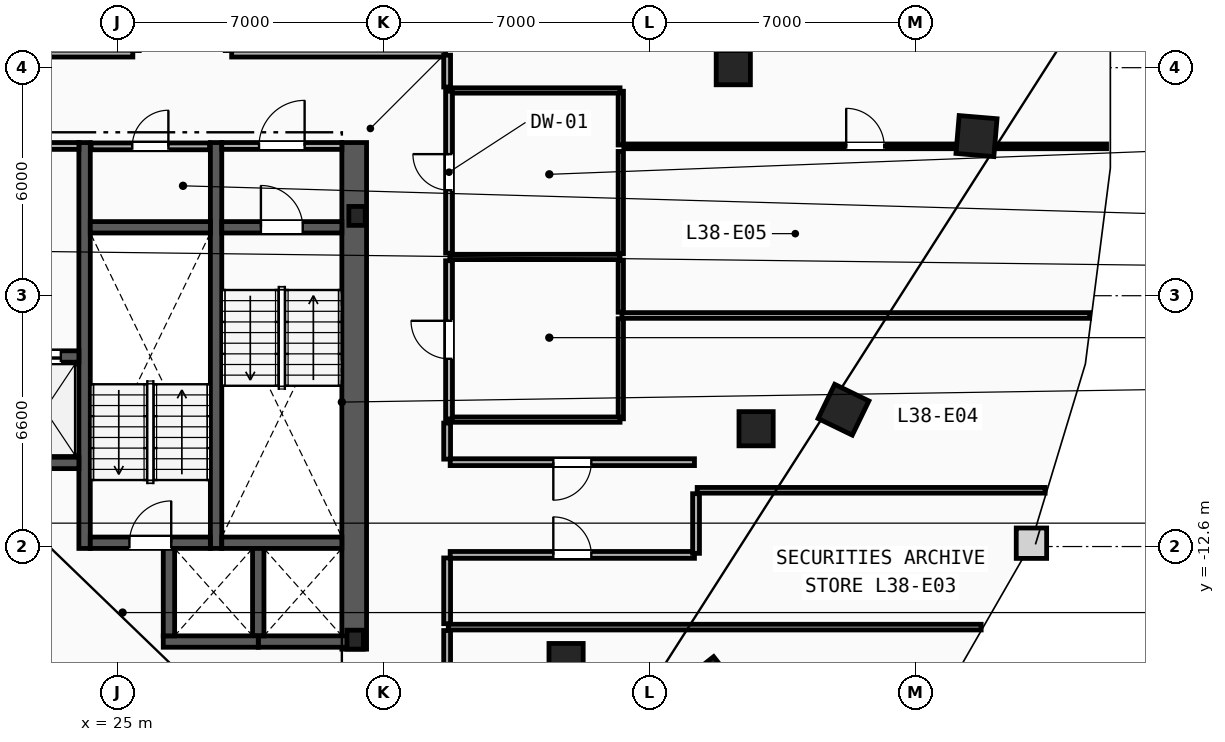
"""IFC4 building model, lengths in metres.
Left out: names, types, materials, properties, quantities, classifications, styles, units other than length and angle.
Written with IfcOpenShell. Run it as: python <this file> out.ifc"""

import sys

from ifc_helpers import new_model, si_unit, direction, frame, frame_2d, origin, origin_2d, place, context, subcontext, project, spatial, rectangle, i_section, extrude, element, fill, save


model = new_model("IFC4")
c1 = context("Model", 3, precision=1e-05, world=origin(), true_north=direction((0.0, 1.0)))
c2 = subcontext(c1, "Body", "Model", "MODEL_VIEW")
j1 = project(units=[si_unit("LENGTHUNIT", "METRE"), si_unit("PLANEANGLEUNIT", "RADIAN")], contexts=[c1])
p1 = place(None, origin())
s1 = spatial("IfcSite", under=j1, at=p1, CompositionType="ELEMENT")
p2 = place(p1, origin())
s2 = spatial("IfcBuilding", under=s1, at=p2, CompositionType="ELEMENT")
p3 = place(p2, frame((0.0, 0.0, 147.6)))
s3 = spatial("IfcBuildingStorey", under=s2, at=p3, CompositionType="ELEMENT", Elevation=147.6)
for number, where, z_axis, x_axis in (
    (1, (31.3, -3.9, 0.0), (0.0, 0.0, 1.0), (1.0, 0.0, 0.0)),
    (2, (31.25, -15.05, 0.0), (0.0, 0.0, 1.0), (1.0, 0.0, 0.0)),
):
    element("IfcColumn", number, at=place(p3, frame(where, z_axis=z_axis, x_axis=x_axis)), inside=s3, PredefinedType="COLUMN", context=c2, shape_type="SweptSolid", body=[
        extrude(i_section(OverallWidth=0.432, OverallDepth=0.498, WebThickness=0.056, FlangeThickness=0.089, FilletRadius=0.018, at=origin_2d()), origin(), (0.0, 0.0, 1.0), 3.6),
    ])
for number, where, z_axis, x_axis in (
    (3, (41.2, 0.0, 0.0), (0.0, 0.0, 1.0), (1.0, 0.0, 0.0)),
    (4, (41.8, -9.5, 0.0), (0.0, 0.0, 1.0), (1.0, 0.0, 0.0)),
    (5, (36.8, -15.6, 0.0), (0.0, 0.0, 1.0), (1.0, 0.0, 0.0)),
):
    element("IfcColumn", number, at=place(p3, frame(where, z_axis=z_axis, x_axis=x_axis)), inside=s3, PredefinedType="COLUMN", context=c2, shape_type="SweptSolid", body=[
        extrude(rectangle(XDim=0.9, YDim=0.9, at=origin_2d()), origin(), (0.0, 0.0, 1.0), 3.6),
    ])
for number, where, z_axis, x_axis in (
    (6, (40.6, -16.2, 0.0), (0.0, 0.0, 1.0), (0.785, 0.619, 0.0)),
    (7, (44.1, -9.0, 0.0), (0.0, 0.0, 1.0), (0.437, 0.899, 0.0)),
    (8, (47.6, -1.8, 0.0), (0.0, 0.0, 1.0), (0.084, 0.997, 0.0)),
):
    element("IfcColumn", number, at=place(p3, frame(where, z_axis=z_axis, x_axis=x_axis)), inside=s3, PredefinedType="COLUMN", context=c2, shape_type="SweptSolid", body=[
        extrude(rectangle(XDim=1.0, YDim=1.0, at=origin_2d()), origin(), (0.0, 0.0, 1.0), 3.6),
    ])
p4 = place(p3, frame((31.225, -15.3, 0.0), z_axis=(0.0, 0.0, 1.0), x_axis=(0.0, 1.0, 0.0)))
e9 = element("IfcWall", 9, at=p4, inside=s3, PredefinedType="SHEAR", context=c2, shape_type="SweptSolid", body=[
    extrude(rectangle(XDim=13.33, YDim=0.65, at=frame_2d((6.665, 0.0))), origin(), (0.0, 0.0, 1.0), 3.36),
])
for number, where, z_axis, x_axis in (
    (10, (27.59, -12.65, 0.0), (0.0, 0.0, 1.0), (0.0, 1.0, 0.0)),
    (11, (24.13, -12.65, 0.0), (0.0, 0.0, 1.0), (0.0, 1.0, 0.0)),
):
    element("IfcWall", number, at=place(p3, frame(where, z_axis=z_axis, x_axis=x_axis)), inside=s3, PredefinedType="SHEAR", context=c2, shape_type="SweptSolid", body=[
        extrude(rectangle(XDim=10.68, YDim=0.3, at=frame_2d((5.34, 0.0))), origin(), (0.0, 0.0, 1.0), 3.36),
    ])
p5 = place(p3, frame((27.74, -4.2, 0.0), z_axis=(0.0, 0.0, 1.0), x_axis=(1.0, 0.0, 0.0)))
e12 = element("IfcWall", 12, at=p5, inside=s3, PredefinedType="SHEAR", context=c2, shape_type="SweptSolid", body=[
    extrude(rectangle(XDim=3.16, YDim=0.3, at=frame_2d((1.58, 0.0))), origin(), (0.0, 0.0, 1.0), 3.36),
])
p6 = place(p5, frame((1.03, 0.0, 0.0)))
e13 = element("IfcOpeningElement", 13, at=p6, cuts=e12, PredefinedType="OPENING", context=c2, shape_type="SweptSolid", body=[
    extrude(rectangle(XDim=1.1, YDim=2.15, at=frame_2d((0.55, 1.075))), frame((0.0, 0.16, 0.0), z_axis=(0.0, -1.0, 0.0), x_axis=(1.0, 0.0, 0.0)), (0.0, 0.0, 1.0), 0.32),
])
p7 = place(p3, frame((27.74, -12.5, 0.0), z_axis=(0.0, 0.0, 1.0), x_axis=(1.0, 0.0, 0.0)))
e14 = element("IfcWall", 14, at=p7, inside=s3, PredefinedType="SHEAR", context=c2, shape_type="SweptSolid", body=[
    extrude(rectangle(XDim=3.16, YDim=0.3, at=frame_2d((1.58, 0.0))), origin(), (0.0, 0.0, 1.0), 3.36),
])
p8 = place(p3, frame((24.28, -12.5, 0.0), z_axis=(0.0, 0.0, 1.0), x_axis=(1.0, 0.0, 0.0)))
e15 = element("IfcWall", 15, at=p8, inside=s3, PredefinedType="SHEAR", context=c2, shape_type="SweptSolid", body=[
    extrude(rectangle(XDim=3.16, YDim=0.3, at=frame_2d((1.58, 0.0))), origin(), (0.0, 0.0, 1.0), 3.36),
])
p9 = place(p8, frame((1.03, 0.0, 0.0)))
e16 = element("IfcOpeningElement", 16, at=p9, cuts=e15, PredefinedType="OPENING", context=c2, shape_type="SweptSolid", body=[
    extrude(rectangle(XDim=1.1, YDim=2.15, at=frame_2d((0.55, 1.075))), frame((0.0, 0.16, 0.0), z_axis=(0.0, -1.0, 0.0), x_axis=(1.0, 0.0, 0.0)), (0.0, 0.0, 1.0), 0.32),
])
p10 = place(p3, frame((24.28, -4.2, 0.0), z_axis=(0.0, 0.0, 1.0), x_axis=(1.0, 0.0, 0.0)))
e17 = element("IfcWall", 17, at=p10, inside=s3, PredefinedType="SHEAR", context=c2, shape_type="SweptSolid", body=[
    extrude(rectangle(XDim=3.16, YDim=0.3, at=frame_2d((1.58, 0.0))), origin(), (0.0, 0.0, 1.0), 3.36),
])
p11 = place(p3, frame((20.98, -2.06, 0.0), z_axis=(0.0, 0.0, 1.0), x_axis=(1.0, 0.0, 0.0)))
e18 = element("IfcWall", 18, at=p11, inside=s3, PredefinedType="PARTITIONING", context=c2, shape_type="SweptSolid", body=[
    extrude(rectangle(XDim=3.0, YDim=0.18, at=frame_2d((1.5, 0.0))), origin(), (0.0, 0.0, 1.0), 3.36),
])
p12 = place(p11, frame((0.9, 0.0, 0.0)))
e19 = element("IfcOpeningElement", 19, at=p12, cuts=e18, PredefinedType="OPENING", context=c2, shape_type="SweptSolid", body=[
    extrude(rectangle(XDim=1.2, YDim=2.15, at=frame_2d((0.6, 1.075))), frame((0.0, 0.1, 0.0), z_axis=(0.0, -1.0, 0.0), x_axis=(1.0, 0.0, 0.0)), (0.0, 0.0, 1.0), 0.2),
])
p13 = place(p3, frame((27.74, -2.06, 0.0), z_axis=(0.0, 0.0, 1.0), x_axis=(1.0, 0.0, 0.0)))
e20 = element("IfcWall", 20, at=p13, inside=s3, PredefinedType="PARTITIONING", context=c2, shape_type="SweptSolid", body=[
    extrude(rectangle(XDim=3.16, YDim=0.18, at=frame_2d((1.58, 0.0))), origin(), (0.0, 0.0, 1.0), 3.36),
])
p14 = place(p13, frame((0.98, 0.0, 0.0)))
e21 = element("IfcOpeningElement", 21, at=p14, cuts=e20, PredefinedType="OPENING", context=c2, shape_type="SweptSolid", body=[
    extrude(rectangle(XDim=1.2, YDim=2.15, at=frame_2d((0.6, 1.075))), frame((0.0, 0.1, 0.0), z_axis=(0.0, -1.0, 0.0), x_axis=(1.0, 0.0, 0.0)), (0.0, 0.0, 1.0), 0.2),
])
p15 = place(p3, frame((21.88, -7.6, 0.0), z_axis=(0.0, 0.0, 1.0), x_axis=(1.0, 0.0, 0.0)))
e22 = element("IfcWall", 22, at=p15, inside=s3, PredefinedType="SHEAR", context=c2, shape_type="SweptSolid", body=[
    extrude(rectangle(XDim=2.1, YDim=0.3, at=frame_2d((1.05, 0.0))), origin(), (0.0, 0.0, 1.0), 3.36),
])
p16 = place(p15, frame((0.475, 0.0, 0.0)))
e23 = element("IfcOpeningElement", 23, at=p16, cuts=e22, PredefinedType="OPENING", context=c2, shape_type="SweptSolid", body=[
    extrude(rectangle(XDim=1.15, YDim=2.2, at=frame_2d((0.575, 1.1))), frame((0.0, 0.16, 0.0), z_axis=(0.0, -1.0, 0.0), x_axis=(1.0, 0.0, 0.0)), (0.0, 0.0, 1.0), 0.32),
])
p17 = place(p3, frame((21.88, -10.4, 0.0), z_axis=(0.0, 0.0, 1.0), x_axis=(1.0, 0.0, 0.0)))
e24 = element("IfcWall", 24, at=p17, inside=s3, PredefinedType="SHEAR", context=c2, shape_type="SweptSolid", body=[
    extrude(rectangle(XDim=2.1, YDim=0.3, at=frame_2d((1.05, 0.0))), origin(), (0.0, 0.0, 1.0), 3.36),
])
p18 = place(p3, frame((28.7, -15.1, 0.0), z_axis=(0.0, 0.0, 1.0), x_axis=(1.0, 0.0, 0.0)))
e25 = element("IfcWall", 25, at=p18, inside=s3, PredefinedType="SHEAR", context=c2, shape_type="SweptSolid", body=[
    extrude(rectangle(XDim=2.5, YDim=0.3, at=frame_2d((1.25, 0.0))), origin(), (0.0, 0.0, 1.0), 3.36),
])
p19 = place(p3, frame((28.7, -14.95, 0.0), z_axis=(0.0, 0.0, 1.0), x_axis=(0.0, 1.0, 0.0)))
e26 = element("IfcWall", 26, at=p19, inside=s3, PredefinedType="SHEAR", context=c2, shape_type="SweptSolid", body=[
    extrude(rectangle(XDim=2.3, YDim=0.3, at=frame_2d((1.15, 0.0))), origin(), (0.0, 0.0, 1.0), 3.36),
])
p20 = place(p3, frame((26.2, -15.1, 0.0), z_axis=(0.0, 0.0, 1.0), x_axis=(1.0, 0.0, 0.0)))
e27 = element("IfcWall", 27, at=p20, inside=s3, PredefinedType="SHEAR", context=c2, shape_type="SweptSolid", body=[
    extrude(rectangle(XDim=2.5, YDim=0.3, at=frame_2d((1.25, 0.0))), origin(), (0.0, 0.0, 1.0), 3.36),
])
p21 = place(p3, frame((26.35, -14.95, 0.0), z_axis=(0.0, 0.0, 1.0), x_axis=(0.0, 1.0, 0.0)))
e28 = element("IfcWall", 28, at=p21, inside=s3, PredefinedType="SHEAR", context=c2, shape_type="SweptSolid", body=[
    extrude(rectangle(XDim=2.3, YDim=0.3, at=frame_2d((1.15, 0.0))), origin(), (0.0, 0.0, 1.0), 3.36),
])
p22 = place(p3, frame((24.3, -2.07, 0.0), z_axis=(0.0, 0.0, 1.0), x_axis=(1.0, 0.0, 0.0)))
e29 = element("IfcWall", 29, at=p22, inside=s3, PredefinedType="PARTITIONING", context=c2, shape_type="SweptSolid", body=[
    extrude(rectangle(XDim=3.12, YDim=0.18, at=frame_2d((1.56, 0.0))), origin(), (0.0, 0.0, 1.0), 3.36),
])
p23 = place(p22, frame((1.085, 0.0, 0.0)))
e30 = element("IfcOpeningElement", 30, at=p23, cuts=e29, PredefinedType="OPENING", context=c2, shape_type="SweptSolid", body=[
    extrude(rectangle(XDim=0.95, YDim=2.1, at=frame_2d((0.475, 1.05))), frame((0.0, 0.1, 0.0), z_axis=(0.0, -1.0, 0.0), x_axis=(1.0, 0.0, 0.0)), (0.0, 0.0, 1.0), 0.2),
])
p24 = place(p3, frame((38.24, -9.24, 0.0), z_axis=(0.0, 0.0, 1.0), x_axis=(0.0, 1.0, 0.0)))
e31 = element("IfcWall", 31, at=p24, inside=s3, PredefinedType="PARTITIONING", context=c2, shape_type="SweptSolid", body=[
    extrude(rectangle(XDim=2.635, YDim=0.14, at=frame_2d((1.317, 0.0))), origin(), (0.0, 0.0, 1.0), 3.36),
])
p25 = place(p3, frame((38.24, -6.435, 0.0), z_axis=(0.0, 0.0, 1.0), x_axis=(0.0, 1.0, 0.0)))
e32 = element("IfcWall", 32, at=p25, inside=s3, PredefinedType="PARTITIONING", context=c2, shape_type="SweptSolid", body=[
    extrude(rectangle(XDim=1.37, YDim=0.14, at=frame_2d((0.685, 0.0))), origin(), (0.0, 0.0, 1.0), 3.36),
])
p26 = place(p3, frame((38.24, -4.895, 0.0), z_axis=(0.0, 0.0, 1.0), x_axis=(0.0, 1.0, 0.0)))
e33 = element("IfcWall", 33, at=p26, inside=s3, PredefinedType="PARTITIONING", context=c2, shape_type="SweptSolid", body=[
    extrude(rectangle(XDim=2.69, YDim=0.14, at=frame_2d((1.345, 0.0))), origin(), (0.0, 0.0, 1.0), 3.36),
])
p27 = place(p3, frame((38.24, -2.035, 0.0), z_axis=(0.0, 0.0, 1.0), x_axis=(0.0, 1.0, 0.0)))
e34 = element("IfcWall", 34, at=p27, inside=s3, PredefinedType="PARTITIONING", context=c2, shape_type="SweptSolid", body=[
    extrude(rectangle(XDim=1.415, YDim=0.14, at=frame_2d((0.708, 0.0))), origin(), (0.0, 0.0, 1.0), 3.36),
])
for number, where, z_axis, x_axis in (
    (35, (33.74, -0.6, 0.0), (0.0, 0.0, 1.0), (1.0, 0.0, 0.0)),
    (36, (33.74, -4.98, 0.0), (0.0, 0.0, 1.0), (1.0, 0.0, 0.0)),
    (37, (33.74, -9.26, 0.0), (0.0, 0.0, 1.0), (1.0, 0.0, 0.0)),
):
    element("IfcWall", number, at=place(p3, frame(where, z_axis=z_axis, x_axis=x_axis)), inside=s3, PredefinedType="PARTITIONING", context=c2, shape_type="SweptSolid", body=[
        extrude(rectangle(XDim=4.48, YDim=0.14, at=frame_2d((2.24, 0.0))), origin(), (0.0, 0.0, 1.0), 3.36),
    ])
p28 = place(p3, frame((33.72, -4.88, 0.0), z_axis=(0.0, 0.0, 1.0), x_axis=(0.0, 1.0, 0.0)))
e38 = element("IfcWall", 38, at=p28, inside=s3, PredefinedType="PARTITIONING", context=c2, shape_type="SweptSolid", body=[
    extrude(rectangle(XDim=4.26, YDim=0.18, at=frame_2d((2.13, 0.0))), origin(), (0.0, 0.0, 1.0), 3.36),
])
p29 = place(p28, frame((1.655, 0.0, 0.0)))
e39 = element("IfcOpeningElement", 39, at=p29, cuts=e38, PredefinedType="OPENING", context=c2, shape_type="SweptSolid", body=[
    extrude(rectangle(XDim=0.95, YDim=2.1, at=frame_2d((0.475, 1.05))), frame((0.0, 0.1, 0.0), z_axis=(0.0, -1.0, 0.0), x_axis=(1.0, 0.0, 0.0)), (0.0, 0.0, 1.0), 0.2),
])
p30 = place(p3, frame((33.72, -9.24, 0.0), z_axis=(0.0, 0.0, 1.0), x_axis=(0.0, 1.0, 0.0)))
e40 = element("IfcWall", 40, at=p30, inside=s3, PredefinedType="PARTITIONING", context=c2, shape_type="SweptSolid", body=[
    extrude(rectangle(XDim=4.16, YDim=0.18, at=frame_2d((2.08, 0.0))), origin(), (0.0, 0.0, 1.0), 3.36),
])
p31 = place(p30, frame((1.58, 0.0, 0.0)))
e41 = element("IfcOpeningElement", 41, at=p31, cuts=e40, PredefinedType="OPENING", context=c2, shape_type="SweptSolid", body=[
    extrude(rectangle(XDim=1.0, YDim=2.15, at=frame_2d((0.5, 1.075))), frame((0.0, 0.1, 0.0), z_axis=(0.0, -1.0, 0.0), x_axis=(1.0, 0.0, 0.0)), (0.0, 0.0, 1.0), 0.2),
])
p32 = place(p3, frame((38.27, -6.52, 0.0), z_axis=(0.0, 0.0, 1.0), x_axis=(1.0, 0.0, 0.0)))
e42 = element("IfcWall", 42, at=p32, inside=s3, PredefinedType="PARTITIONING", context=c2, shape_type="SweptSolid", body=[
    extrude(rectangle(XDim=12.307, YDim=0.15, at=frame_2d((6.154, 0.0))), origin(), (0.0, 0.0, 1.0), 3.36),
])
p33 = place(p3, frame((40.25, -11.12, 0.0), z_axis=(0.0, 0.0, 1.0), x_axis=(1.0, 0.0, 0.0)))
e43 = element("IfcWall", 43, at=p33, inside=s3, PredefinedType="PARTITIONING", context=c2, shape_type="SweptSolid", body=[
    extrude(rectangle(XDim=9.156, YDim=0.15, at=frame_2d((4.578, 0.0))), origin(), (0.0, 0.0, 1.0), 3.36),
])
p34 = place(p3, frame((33.7, -14.72, 0.0), z_axis=(0.0, 0.0, 1.0), x_axis=(1.0, 0.0, 0.0)))
e44 = element("IfcWall", 44, at=p34, inside=s3, PredefinedType="PARTITIONING", context=c2, shape_type="SweptSolid", body=[
    extrude(rectangle(XDim=14.023, YDim=0.15, at=frame_2d((7.011, 0.0))), origin(), (0.0, 0.0, 1.0), 3.36),
])
p35 = place(p3, frame((33.67, -17.428, 0.0), z_axis=(0.0, 0.0, 1.0), x_axis=(0.0, 1.0, 0.0)))
e45 = element("IfcWall", 45, at=p35, inside=s3, PredefinedType="PARTITIONING", context=c2, shape_type="SweptSolid", body=[
    extrude(rectangle(XDim=2.618, YDim=0.18, at=frame_2d((1.309, 0.0))), origin(), (0.0, 0.0, 1.0), 3.36),
])
p36 = place(p3, frame((33.75, -12.82, 0.0), z_axis=(0.0, 0.0, 1.0), x_axis=(1.0, 0.0, 0.0)))
e46 = element("IfcWall", 46, at=p36, inside=s3, PredefinedType="PARTITIONING", context=c2, shape_type="SweptSolid", body=[
    extrude(rectangle(XDim=6.428, YDim=0.18, at=frame_2d((3.214, 0.0))), origin(), (0.0, 0.0, 1.0), 3.36),
])
p37 = place(p36, frame((2.714, 0.0, 0.0)))
e47 = element("IfcOpeningElement", 47, at=p37, cuts=e46, PredefinedType="OPENING", context=c2, shape_type="SweptSolid", body=[
    extrude(rectangle(XDim=1.0, YDim=2.15, at=frame_2d((0.5, 1.075))), frame((0.0, 0.1, 0.0), z_axis=(0.0, -1.0, 0.0), x_axis=(1.0, 0.0, 0.0)), (0.0, 0.0, 1.0), 0.2),
])
p38 = place(p3, frame((33.67, -14.63, 0.0), z_axis=(0.0, 0.0, 1.0), x_axis=(0.0, 1.0, 0.0)))
e48 = element("IfcWall", 48, at=p38, inside=s3, PredefinedType="PARTITIONING", context=c2, shape_type="SweptSolid", body=[
    extrude(rectangle(XDim=1.73, YDim=0.18, at=frame_2d((0.865, 0.0))), origin(), (0.0, 0.0, 1.0), 3.36),
])
p39 = place(p3, frame((40.22, -12.779, 0.0), z_axis=(0.0, 0.0, 1.0), x_axis=(0.0, 1.0, 0.0)))
e49 = element("IfcWall", 49, at=p39, inside=s3, PredefinedType="PARTITIONING", context=c2, shape_type="SweptSolid", body=[
    extrude(rectangle(XDim=1.569, YDim=0.18, at=frame_2d((0.784, 0.0))), origin(), (0.0, 0.0, 1.0), 3.36),
])
p40 = place(p3, frame((40.178, -10.38, 0.0), z_axis=(0.0, 0.0, 1.0), x_axis=(-1.0, 0.0, 0.0)))
e50 = element("IfcWall", 50, at=p40, inside=s3, PredefinedType="PARTITIONING", context=c2, shape_type="SweptSolid", body=[
    extrude(rectangle(XDim=6.428, YDim=0.18, at=frame_2d((3.214, 0.0))), origin(), (0.0, 0.0, 1.0), 3.36),
])
p41 = place(p40, frame((2.714, 0.0, 0.0)))
e51 = element("IfcOpeningElement", 51, at=p41, cuts=e50, PredefinedType="OPENING", context=c2, shape_type="SweptSolid", body=[
    extrude(rectangle(XDim=1.0, YDim=2.15, at=frame_2d((0.5, 1.075))), frame((0.0, 0.1, 0.0), z_axis=(0.0, -1.0, 0.0), x_axis=(1.0, 0.0, 0.0)), (0.0, 0.0, 1.0), 0.2),
])
p42 = place(p3, frame((33.67, -10.3, 0.0), z_axis=(0.0, 0.0, 1.0), x_axis=(0.0, 1.0, 0.0)))
e52 = element("IfcWall", 52, at=p42, inside=s3, PredefinedType="PARTITIONING", context=c2, shape_type="SweptSolid", body=[
    extrude(rectangle(XDim=0.949, YDim=0.18, at=frame_2d((0.474, 0.0))), origin(), (0.0, 0.0, 1.0), 3.36),
])
p43 = place(p3, frame((25.4, 0.37, 0.0), z_axis=(0.0, 0.0, 1.0), x_axis=(-1.0, 0.0, 0.0)))
e53 = element("IfcWall", 53, at=p43, inside=s3, PredefinedType="PARTITIONING", context=c2, shape_type="SweptSolid", body=[
    extrude(rectangle(XDim=8.578, YDim=0.18, at=frame_2d((4.289, 0.0))), origin(), (0.0, 0.0, 1.0), 3.36),
])
p44 = place(p43, frame((3.789, 0.0, 0.0)))
e54 = element("IfcOpeningElement", 54, at=p44, cuts=e53, PredefinedType="OPENING", context=c2, shape_type="SweptSolid", body=[
    extrude(rectangle(XDim=1.0, YDim=2.15, at=frame_2d((0.5, 1.075))), frame((0.0, 0.1, 0.0), z_axis=(0.0, -1.0, 0.0), x_axis=(1.0, 0.0, 0.0)), (0.0, 0.0, 1.0), 0.2),
])
p45 = place(p3, frame((33.628, 0.37, 0.0), z_axis=(0.0, 0.0, 1.0), x_axis=(-1.0, 0.0, 0.0)))
e55 = element("IfcWall", 55, at=p45, inside=s3, PredefinedType="PARTITIONING", context=c2, shape_type="SweptSolid", body=[
    extrude(rectangle(XDim=5.628, YDim=0.18, at=frame_2d((2.814, 0.0))), origin(), (0.0, 0.0, 1.0), 3.36),
])
p46 = place(p3, frame((33.67, -0.509, 0.0), z_axis=(0.0, 0.0, 1.0), x_axis=(0.0, 1.0, 0.0)))
e56 = element("IfcWall", 56, at=p46, inside=s3, PredefinedType="PARTITIONING", context=c2, shape_type="SweptSolid", body=[
    extrude(rectangle(XDim=0.837, YDim=0.18, at=frame_2d((0.418, 0.0))), origin(), (0.0, 0.0, 1.0), 3.36),
])
p47 = place(p3, frame((38.32, -2.07, 0.0), z_axis=(0.0, 0.0, 1.0), x_axis=(1.0, 0.0, 0.0)))
e57 = element("IfcWall", 57, at=p47, inside=s3, PredefinedType="PARTITIONING", context=c2, shape_type="SweptSolid", body=[
    extrude(rectangle(XDim=12.702, YDim=0.125, at=frame_2d((6.351, 0.0))), origin(), (0.0, 0.0, 1.0), 3.36),
])
p48 = place(p47, frame((5.851, 0.0, 0.0)))
e58 = element("IfcOpeningElement", 58, at=p48, cuts=e57, PredefinedType="OPENING", context=c2, shape_type="SweptSolid", body=[
    extrude(rectangle(XDim=1.0, YDim=2.15, at=frame_2d((0.5, 1.075))), frame((0.0, 0.073, 0.0), z_axis=(0.0, -1.0, 0.0), x_axis=(1.0, 0.0, 0.0)), (0.0, 0.0, 1.0), 0.145),
])
p49 = place(p6, origin())
e59 = element("IfcDoor", 59, at=p49, inside=s3, OperationType="SINGLE_SWING_LEFT", PredefinedType="DOOR", context=c2, shape_type="SweptSolid", body=[
    extrude(rectangle(XDim=1.1, YDim=2.15, at=frame_2d((0.55, 1.075))), frame((0.0, 0.025, 0.0), z_axis=(0.0, -1.0, 0.0), x_axis=(1.0, 0.0, 0.0)), (0.0, 0.0, 1.0), 0.05),
])
fill(e13, e59)
p50 = place(p9, origin())
e60 = element("IfcDoor", 60, at=p50, inside=s3, OperationType="SINGLE_SWING_RIGHT", PredefinedType="DOOR", context=c2, shape_type="SweptSolid", body=[
    extrude(rectangle(XDim=1.1, YDim=2.15, at=frame_2d((0.55, 1.075))), frame((0.0, 0.025, 0.0), z_axis=(0.0, -1.0, 0.0), x_axis=(1.0, 0.0, 0.0)), (0.0, 0.0, 1.0), 0.05),
])
fill(e16, e60)
p51 = place(p14, origin())
e61 = element("IfcDoor", 61, at=p51, inside=s3, OperationType="SINGLE_SWING_RIGHT", PredefinedType="DOOR", context=c2, shape_type="SweptSolid", body=[
    extrude(rectangle(XDim=1.2, YDim=2.15, at=frame_2d((0.6, 1.075))), frame((0.0, 0.025, 0.0), z_axis=(0.0, -1.0, 0.0), x_axis=(1.0, 0.0, 0.0)), (0.0, 0.0, 1.0), 0.05),
])
fill(e21, e61)
p52 = place(p16, origin())
e62 = element("IfcDoor", 62, at=p52, inside=s3, OperationType="SLIDING_TO_LEFT", PredefinedType="TRAPDOOR", context=c2, shape_type="SweptSolid", body=[
    extrude(rectangle(XDim=1.15, YDim=2.2, at=frame_2d((0.575, 1.1))), frame((0.0, 0.025, 0.0), z_axis=(0.0, -1.0, 0.0), x_axis=(1.0, 0.0, 0.0)), (0.0, 0.0, 1.0), 0.05),
])
fill(e23, e62)
p53 = place(p48, origin())
e63 = element("IfcDoor", 63, at=p53, inside=s3, OperationType="SINGLE_SWING_LEFT", PredefinedType="DOOR", context=c2, shape_type="SweptSolid", body=[
    extrude(rectangle(XDim=1.0, YDim=2.15, at=frame_2d((0.5, 1.075))), frame((0.0, 0.025, 0.0), z_axis=(0.0, -1.0, 0.0), x_axis=(1.0, 0.0, 0.0)), (0.0, 0.0, 1.0), 0.05),
])
fill(e58, e63)
p54 = place(p37, origin())
e64 = element("IfcDoor", 64, at=p54, inside=s3, OperationType="SINGLE_SWING_LEFT", PredefinedType="DOOR", context=c2, shape_type="SweptSolid", body=[
    extrude(rectangle(XDim=1.0, YDim=2.15, at=frame_2d((0.5, 1.075))), frame((0.0, 0.025, 0.0), z_axis=(0.0, -1.0, 0.0), x_axis=(1.0, 0.0, 0.0)), (0.0, 0.0, 1.0), 0.05),
])
fill(e47, e64)
p55 = place(p41, origin())
e65 = element("IfcDoor", 65, at=p55, inside=s3, OperationType="SINGLE_SWING_RIGHT", PredefinedType="DOOR", context=c2, shape_type="SweptSolid", body=[
    extrude(rectangle(XDim=1.0, YDim=2.15, at=frame_2d((0.5, 1.075))), frame((0.0, 0.025, 0.0), z_axis=(0.0, -1.0, 0.0), x_axis=(1.0, 0.0, 0.0)), (0.0, 0.0, 1.0), 0.05),
])
fill(e51, e65)
p56 = place(p29, origin())
e66 = element("IfcDoor", 66, at=p56, inside=s3, OperationType="SINGLE_SWING_RIGHT", PredefinedType="DOOR", context=c2, shape_type="SweptSolid", body=[
    extrude(rectangle(XDim=0.95, YDim=2.1, at=frame_2d((0.475, 1.05))), frame((0.0, 0.025, 0.0), z_axis=(0.0, -1.0, 0.0), x_axis=(1.0, 0.0, 0.0)), (0.0, 0.0, 1.0), 0.05),
])
fill(e39, e66)
p57 = place(p31, origin())
e67 = element("IfcDoor", 67, at=p57, inside=s3, OperationType="SINGLE_SWING_RIGHT", PredefinedType="DOOR", context=c2, shape_type="SweptSolid", body=[
    extrude(rectangle(XDim=1.0, YDim=2.15, at=frame_2d((0.5, 1.075))), frame((0.0, 0.025, 0.0), z_axis=(0.0, -1.0, 0.0), x_axis=(1.0, 0.0, 0.0)), (0.0, 0.0, 1.0), 0.05),
])
fill(e41, e67)
p58 = place(p23, origin())
e68 = element("IfcDoor", 68, at=p58, inside=s3, OperationType="SINGLE_SWING_RIGHT", PredefinedType="DOOR", context=c2, shape_type="SweptSolid", body=[
    extrude(rectangle(XDim=0.95, YDim=2.1, at=frame_2d((0.475, 1.05))), frame((0.0, 0.025, 0.0), z_axis=(0.0, -1.0, 0.0), x_axis=(1.0, 0.0, 0.0)), (0.0, 0.0, 1.0), 0.05),
])
fill(e30, e68)
save(model, sys.argv[1])
